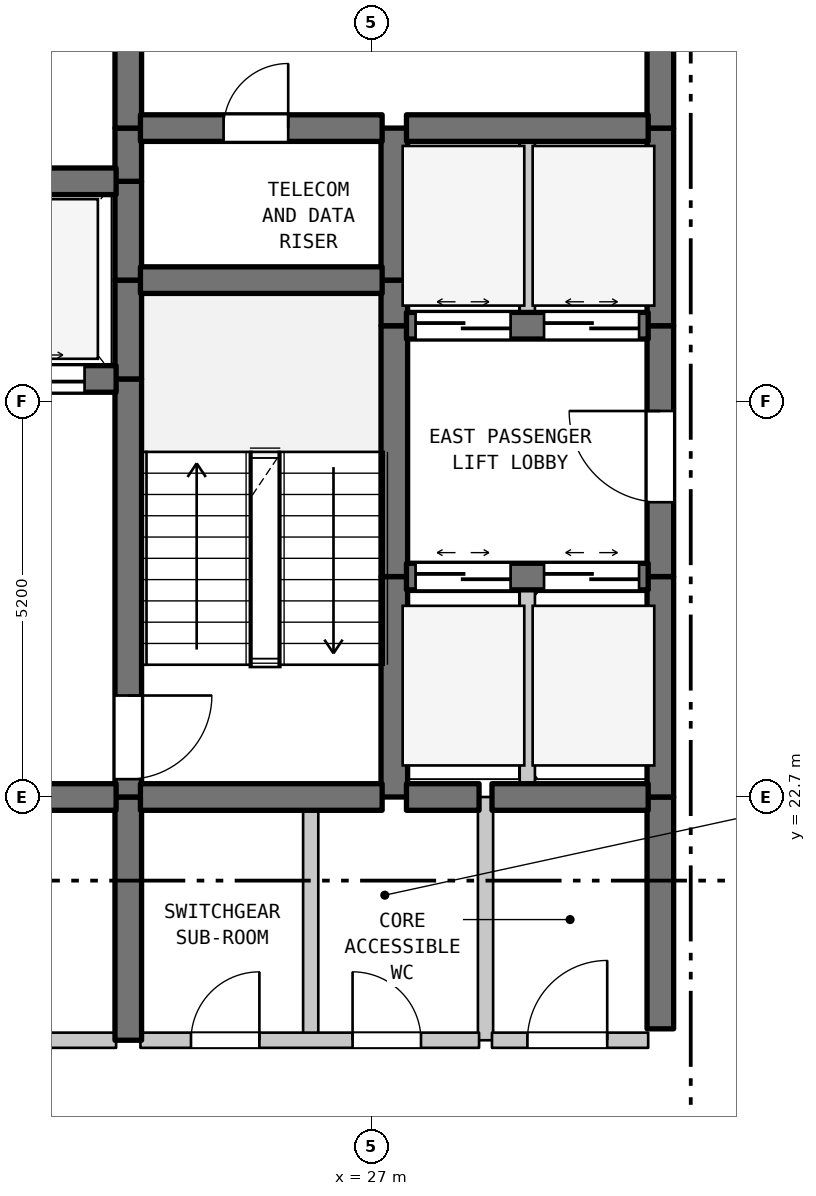
"""IFC4 building model, lengths in metres.
Left out: names, types, materials, properties, quantities, classifications, styles, units other than length and angle.
Written with IfcOpenShell. Run it as: python <this file> out.ifc"""

import sys

from ifc_helpers import new_model, si_unit, direction, frame, frame_2d, origin, place, context, subcontext, project, spatial, rectangle, extrude, element, fill, save


model = new_model("IFC4")
c1 = context("Model", 3, precision=1e-05, world=origin(), true_north=direction((0.0, 1.0)))
c2 = subcontext(c1, "Body", "Model", "MODEL_VIEW")
j1 = project(units=[si_unit("LENGTHUNIT", "METRE"), si_unit("PLANEANGLEUNIT", "RADIAN")], contexts=[c1])
p1 = place(None, origin())
s1 = spatial("IfcSite", under=j1, at=p1, CompositionType="ELEMENT")
p2 = place(p1, origin())
s2 = spatial("IfcBuilding", under=s1, at=p2, CompositionType="ELEMENT")
p3 = place(p2, frame((0.0, 0.0, 27.7)))
s3 = spatial("IfcBuildingStorey", under=s2, at=p3, CompositionType="ELEMENT", Elevation=27.7)
p4 = place(p3, frame((23.8, 19.5, 0.0), z_axis=(0.0, 0.0, 1.0), x_axis=(0.0, 1.0, 0.0)))
e1 = element("IfcWall", 1, at=p4, inside=s3, PredefinedType="SHEAR", context=c2, shape_type="SweptSolid", body=[
    extrude(rectangle(XDim=3.2, YDim=0.35, at=frame_2d((1.6, 0.0))), origin(), (0.0, 0.0, 1.0), 3.385),
])
p5 = place(p3, frame((23.8, 22.7, 0.0), z_axis=(0.0, 0.0, 1.0), x_axis=(0.0, 1.0, 0.0)))
e2 = element("IfcWall", 2, at=p5, inside=s3, PredefinedType="SHEAR", context=c2, shape_type="SweptSolid", body=[
    extrude(rectangle(XDim=5.5, YDim=0.35, at=frame_2d((2.75, 0.0))), origin(), (0.0, 0.0, 1.0), 3.385),
])
p6 = place(p5, frame((0.235, 0.0, 0.0)))
e3 = element("IfcOpeningElement", 3, at=p6, cuts=e2, PredefinedType="OPENING", context=c2, shape_type="SweptSolid", body=[
    extrude(rectangle(XDim=1.1, YDim=2.15, at=frame_2d((0.55, 1.075))), frame((0.0, 0.185, 0.0), z_axis=(0.0, -1.0, 0.0), x_axis=(1.0, 0.0, 0.0)), (0.0, 0.0, 1.0), 0.37),
])
for number, where, z_axis, x_axis in (
    (4, (23.8, 28.2, 0.0), (0.0, 0.0, 1.0), (0.0, 1.0, 0.0)),
    (5, (23.8, 29.5, 0.0), (0.0, 0.0, 1.0), (0.0, 1.0, 0.0)),
):
    element("IfcWall", number, at=place(p3, frame(where, z_axis=z_axis, x_axis=x_axis)), inside=s3, PredefinedType="SHEAR", context=c2, shape_type="SweptSolid", body=[
        extrude(rectangle(XDim=1.3, YDim=0.35, at=frame_2d((0.65, 0.0))), origin(), (0.0, 0.0, 1.0), 3.385),
    ])
p7 = place(p3, frame((23.8, 30.8, 0.0), z_axis=(0.0, 0.0, 1.0), x_axis=(0.0, 1.0, 0.0)))
e6 = element("IfcWall", 6, at=p7, inside=s3, PredefinedType="SHEAR", context=c2, shape_type="SweptSolid", body=[
    extrude(rectangle(XDim=0.7, YDim=0.35, at=frame_2d((0.35, 0.0))), origin(), (0.0, 0.0, 1.0), 3.385),
])
p8 = place(p3, frame((23.8, 31.5, 0.0), z_axis=(0.0, 0.0, 1.0), x_axis=(0.0, 1.0, 0.0)))
e7 = element("IfcWall", 7, at=p8, inside=s3, PredefinedType="SHEAR", context=c2, shape_type="SweptSolid", body=[
    extrude(rectangle(XDim=3.5, YDim=0.35, at=frame_2d((1.75, 0.0))), origin(), (0.0, 0.0, 1.0), 3.385),
])
p9 = place(p8, frame((1.127, 0.0, 0.0)))
e8 = element("IfcOpeningElement", 8, at=p9, cuts=e7, PredefinedType="OPENING", context=c2, shape_type="SweptSolid", body=[
    extrude(rectangle(XDim=1.1, YDim=2.15, at=frame_2d((0.55, 1.075))), frame((0.0, 0.185, 0.0), z_axis=(0.0, -1.0, 0.0), x_axis=(1.0, 0.0, 0.0)), (0.0, 0.0, 1.0), 0.37),
])
p10 = place(p3, frame((26.2, 19.5, 0.0), z_axis=(0.0, 0.0, 1.0), x_axis=(0.0, 1.0, 0.0)))
e9 = element("IfcWall", 9, at=p10, inside=s3, PredefinedType="STANDARD", context=c2, shape_type="SweptSolid", body=[
    extrude(rectangle(XDim=3.2, YDim=0.2, at=frame_2d((1.6, 0.0))), origin(), (0.0, 0.0, 1.0), 3.385),
])
p11 = place(p3, frame((27.3, 22.7, 0.0), z_axis=(0.0, 0.0, 1.0), x_axis=(0.0, 1.0, 0.0)))
e10 = element("IfcWall", 10, at=p11, inside=s3, PredefinedType="SHEAR", context=c2, shape_type="SweptSolid", body=[
    extrude(rectangle(XDim=2.9, YDim=0.35, at=frame_2d((1.45, 0.0))), origin(), (0.0, 0.0, 1.0), 3.385),
])
p12 = place(p3, frame((27.3, 25.6, 0.0), z_axis=(0.0, 0.0, 1.0), x_axis=(0.0, 1.0, 0.0)))
e11 = element("IfcWall", 11, at=p12, inside=s3, PredefinedType="SHEAR", context=c2, shape_type="SweptSolid", body=[
    extrude(rectangle(XDim=3.3, YDim=0.35, at=frame_2d((1.65, 0.0))), origin(), (0.0, 0.0, 1.0), 3.385),
])
p13 = place(p3, frame((27.3, 28.9, 0.0), z_axis=(0.0, 0.0, 1.0), x_axis=(0.0, 1.0, 0.0)))
e12 = element("IfcWall", 12, at=p13, inside=s3, PredefinedType="SHEAR", context=c2, shape_type="SweptSolid", body=[
    extrude(rectangle(XDim=0.6, YDim=0.35, at=frame_2d((0.3, 0.0))), origin(), (0.0, 0.0, 1.0), 3.385),
])
p14 = place(p3, frame((27.3, 29.5, 0.0), z_axis=(0.0, 0.0, 1.0), x_axis=(0.0, 1.0, 0.0)))
e13 = element("IfcWall", 13, at=p14, inside=s3, PredefinedType="SHEAR", context=c2, shape_type="SweptSolid", body=[
    extrude(rectangle(XDim=2.0, YDim=0.35, at=frame_2d((1.0, 0.0))), origin(), (0.0, 0.0, 1.0), 3.385),
])
p15 = place(p3, frame((28.5, 19.5, 0.0), z_axis=(0.0, 0.0, 1.0), x_axis=(0.0, 1.0, 0.0)))
e14 = element("IfcWall", 14, at=p15, inside=s3, PredefinedType="STANDARD", context=c2, shape_type="SweptSolid", body=[
    extrude(rectangle(XDim=3.2, YDim=0.2, at=frame_2d((1.6, 0.0))), origin(), (0.0, 0.0, 1.0), 3.385),
])
p16 = place(p3, frame((29.05, 22.7, 0.0), z_axis=(0.0, 0.0, 1.0), x_axis=(0.0, 1.0, 0.0)))
e15 = element("IfcWall", 15, at=p16, inside=s3, PredefinedType="STANDARD", context=c2, shape_type="SweptSolid", body=[
    extrude(rectangle(XDim=2.9, YDim=0.2, at=frame_2d((1.45, 0.0))), origin(), (0.0, 0.0, 1.0), 3.385),
])
p17 = place(p3, frame((29.05, 28.9, 0.0), z_axis=(0.0, 0.0, 1.0), x_axis=(0.0, 1.0, 0.0)))
e16 = element("IfcWall", 16, at=p17, inside=s3, PredefinedType="STANDARD", context=c2, shape_type="SweptSolid", body=[
    extrude(rectangle(XDim=2.6, YDim=0.2, at=frame_2d((1.3, 0.0))), origin(), (0.0, 0.0, 1.0), 3.385),
])
p18 = place(p3, frame((30.8, 19.65, 0.0), z_axis=(0.0, 0.0, 1.0), x_axis=(0.0, 1.0, 0.0)))
e17 = element("IfcWall", 17, at=p18, inside=s3, PredefinedType="SHEAR", context=c2, shape_type="SweptSolid", body=[
    extrude(rectangle(XDim=3.05, YDim=0.35, at=frame_2d((1.525, 0.0))), origin(), (0.0, 0.0, 1.0), 3.385),
])
p19 = place(p3, frame((30.8, 22.7, 0.0), z_axis=(0.0, 0.0, 1.0), x_axis=(0.0, 1.0, 0.0)))
e18 = element("IfcWall", 18, at=p19, inside=s3, PredefinedType="SHEAR", context=c2, shape_type="SweptSolid", body=[
    extrude(rectangle(XDim=2.9, YDim=0.35, at=frame_2d((1.45, 0.0))), origin(), (0.0, 0.0, 1.0), 3.385),
])
p20 = place(p3, frame((30.8, 25.6, 0.0), z_axis=(0.0, 0.0, 1.0), x_axis=(0.0, 1.0, 0.0)))
e19 = element("IfcWall", 19, at=p20, inside=s3, PredefinedType="SHEAR", context=c2, shape_type="SweptSolid", body=[
    extrude(rectangle(XDim=3.3, YDim=0.35, at=frame_2d((1.65, 0.0))), origin(), (0.0, 0.0, 1.0), 3.385),
])
p21 = place(p20, frame((0.978, 0.0, 0.0)))
e20 = element("IfcOpeningElement", 20, at=p21, cuts=e19, PredefinedType="OPENING", context=c2, shape_type="SweptSolid", body=[
    extrude(rectangle(XDim=1.2, YDim=2.2, at=frame_2d((0.6, 1.1))), frame((0.0, 0.185, 0.0), z_axis=(0.0, -1.0, 0.0), x_axis=(1.0, 0.0, 0.0)), (0.0, 0.0, 1.0), 0.37),
])
p22 = place(p3, frame((30.8, 28.9, 0.0), z_axis=(0.0, 0.0, 1.0), x_axis=(0.0, 1.0, 0.0)))
e21 = element("IfcWall", 21, at=p22, inside=s3, PredefinedType="SHEAR", context=c2, shape_type="SweptSolid", body=[
    extrude(rectangle(XDim=2.6, YDim=0.35, at=frame_2d((1.3, 0.0))), origin(), (0.0, 0.0, 1.0), 3.385),
])
p23 = place(p3, frame((30.8, 31.5, 0.0), z_axis=(0.0, 0.0, 1.0), x_axis=(0.0, 1.0, 0.0)))
e22 = element("IfcWall", 22, at=p23, inside=s3, PredefinedType="SHEAR", context=c2, shape_type="SweptSolid", body=[
    extrude(rectangle(XDim=3.5, YDim=0.35, at=frame_2d((1.75, 0.0))), origin(), (0.0, 0.0, 1.0), 3.385),
])
p24 = place(p23, frame((1.15, 0.0, 0.0)))
e23 = element("IfcOpeningElement", 23, at=p24, cuts=e22, PredefinedType="OPENING", context=c2, shape_type="SweptSolid", body=[
    extrude(rectangle(XDim=1.2, YDim=2.2, at=frame_2d((0.6, 1.1))), frame((0.0, 0.185, 0.0), z_axis=(0.0, -1.0, 0.0), x_axis=(1.0, 0.0, 0.0)), (0.0, 0.0, 1.0), 0.37),
])
p25 = place(p3, frame((19.16, 19.5, 0.0), z_axis=(0.0, 0.0, 1.0), x_axis=(1.0, 0.0, 0.0)))
e24 = element("IfcWall", 24, at=p25, inside=s3, PredefinedType="STANDARD", context=c2, shape_type="SweptSolid", body=[
    extrude(rectangle(XDim=4.48, YDim=0.2, at=frame_2d((2.24, 0.0))), origin(), (0.0, 0.0, 1.0), 3.385),
])
p26 = place(p25, frame((1.64, 0.0, 0.0)))
e25 = element("IfcOpeningElement", 25, at=p26, cuts=e24, PredefinedType="OPENING", context=c2, shape_type="SweptSolid", body=[
    extrude(rectangle(XDim=1.2, YDim=2.2, at=frame_2d((0.6, 1.1))), frame((0.0, 0.11, 0.0), z_axis=(0.0, -1.0, 0.0), x_axis=(1.0, 0.0, 0.0)), (0.0, 0.0, 1.0), 0.22),
])
p27 = place(p3, frame((23.96, 19.5, 0.0), z_axis=(0.0, 0.0, 1.0), x_axis=(1.0, 0.0, 0.0)))
e26 = element("IfcWall", 26, at=p27, inside=s3, PredefinedType="STANDARD", context=c2, shape_type="SweptSolid", body=[
    extrude(rectangle(XDim=4.455, YDim=0.2, at=frame_2d((2.228, 0.0))), origin(), (0.0, 0.0, 1.0), 3.385),
])
p28 = place(p27, frame((0.665, 0.0, 0.0)))
e27 = element("IfcOpeningElement", 27, at=p28, cuts=e26, PredefinedType="OPENING", context=c2, shape_type="SweptSolid", body=[
    extrude(rectangle(XDim=0.9, YDim=2.15, at=frame_2d((0.45, 1.075))), frame((0.0, 0.11, 0.0), z_axis=(0.0, -1.0, 0.0), x_axis=(1.0, 0.0, 0.0)), (0.0, 0.0, 1.0), 0.22),
])
p29 = place(p27, frame((2.791, 0.0, 0.0)))
e28 = element("IfcOpeningElement", 28, at=p29, cuts=e26, PredefinedType="OPENING", context=c2, shape_type="SweptSolid", body=[
    extrude(rectangle(XDim=0.9, YDim=2.15, at=frame_2d((0.45, 1.075))), frame((0.0, 0.11, 0.0), z_axis=(0.0, -1.0, 0.0), x_axis=(1.0, 0.0, 0.0)), (0.0, 0.0, 1.0), 0.22),
])
p30 = place(p3, frame((28.585, 19.5, 0.0), z_axis=(0.0, 0.0, 1.0), x_axis=(1.0, 0.0, 0.0)))
e29 = element("IfcWall", 29, at=p30, inside=s3, PredefinedType="STANDARD", context=c2, shape_type="SweptSolid", body=[
    extrude(rectangle(XDim=2.055, YDim=0.2, at=frame_2d((1.027, 0.0))), origin(), (0.0, 0.0, 1.0), 3.385),
])
p31 = place(p30, frame((0.466, 0.0, 0.0)))
e30 = element("IfcOpeningElement", 30, at=p31, cuts=e29, PredefinedType="OPENING", context=c2, shape_type="SweptSolid", body=[
    extrude(rectangle(XDim=1.05, YDim=2.15, at=frame_2d((0.525, 1.075))), frame((0.0, 0.11, 0.0), z_axis=(0.0, -1.0, 0.0), x_axis=(1.0, 0.0, 0.0)), (0.0, 0.0, 1.0), 0.22),
])
p32 = place(p3, frame((19.16, 22.7, 0.0), z_axis=(0.0, 0.0, 1.0), x_axis=(1.0, 0.0, 0.0)))
e31 = element("IfcWall", 31, at=p32, inside=s3, PredefinedType="SHEAR", context=c2, shape_type="SweptSolid", body=[
    extrude(rectangle(XDim=4.48, YDim=0.35, at=frame_2d((2.24, 0.0))), origin(), (0.0, 0.0, 1.0), 3.385),
])
p33 = place(p32, frame((1.64, 0.0, 0.0)))
e32 = element("IfcOpeningElement", 32, at=p33, cuts=e31, PredefinedType="OPENING", context=c2, shape_type="SweptSolid", body=[
    extrude(rectangle(XDim=1.2, YDim=2.2, at=frame_2d((0.6, 1.1))), frame((0.0, 0.185, 0.0), z_axis=(0.0, -1.0, 0.0), x_axis=(1.0, 0.0, 0.0)), (0.0, 0.0, 1.0), 0.37),
])
p34 = place(p3, frame((23.96, 22.7, 0.0), z_axis=(0.0, 0.0, 1.0), x_axis=(1.0, 0.0, 0.0)))
e33 = element("IfcWall", 33, at=p34, inside=s3, PredefinedType="SHEAR", context=c2, shape_type="SweptSolid", body=[
    extrude(rectangle(XDim=3.18, YDim=0.35, at=frame_2d((1.59, 0.0))), origin(), (0.0, 0.0, 1.0), 3.385),
])
p35 = place(p3, frame((27.46, 22.7, 0.0), z_axis=(0.0, 0.0, 1.0), x_axis=(1.0, 0.0, 0.0)))
e34 = element("IfcWall", 34, at=p35, inside=s3, PredefinedType="SHEAR", context=c2, shape_type="SweptSolid", body=[
    extrude(rectangle(XDim=0.955, YDim=0.35, at=frame_2d((0.478, 0.0))), origin(), (0.0, 0.0, 1.0), 3.385),
])
p36 = place(p3, frame((28.585, 22.7, 0.0), z_axis=(0.0, 0.0, 1.0), x_axis=(1.0, 0.0, 0.0)))
e35 = element("IfcWall", 35, at=p36, inside=s3, PredefinedType="SHEAR", context=c2, shape_type="SweptSolid", body=[
    extrude(rectangle(XDim=2.055, YDim=0.35, at=frame_2d((1.027, 0.0))), origin(), (0.0, 0.0, 1.0), 3.385),
])
p37 = place(p3, frame((27.46, 25.6, 0.0), z_axis=(0.0, 0.0, 1.0), x_axis=(1.0, 0.0, 0.0)))
e36 = element("IfcWall", 36, at=p37, inside=s3, PredefinedType="SHEAR", context=c2, shape_type="SweptSolid", body=[
    extrude(rectangle(XDim=3.18, YDim=0.35, at=frame_2d((1.59, 0.0))), origin(), (0.0, 0.0, 1.0), 3.385),
])
p38 = place(p37, frame((0.12, 0.0, 0.0)))
e37 = element("IfcOpeningElement", 37, at=p38, cuts=e36, PredefinedType="OPENING", context=c2, shape_type="SweptSolid", body=[
    extrude(rectangle(XDim=1.25, YDim=2.2, at=frame_2d((0.625, 1.1))), frame((0.0, 0.185, 0.0), z_axis=(0.0, -1.0, 0.0), x_axis=(1.0, 0.0, 0.0)), (0.0, 0.0, 1.0), 0.37),
])
p39 = place(p37, frame((1.81, 0.0, 0.0)))
e38 = element("IfcOpeningElement", 38, at=p39, cuts=e36, PredefinedType="OPENING", context=c2, shape_type="SweptSolid", body=[
    extrude(rectangle(XDim=1.25, YDim=2.2, at=frame_2d((0.625, 1.1))), frame((0.0, 0.185, 0.0), z_axis=(0.0, -1.0, 0.0), x_axis=(1.0, 0.0, 0.0)), (0.0, 0.0, 1.0), 0.37),
])
p40 = place(p3, frame((19.16, 28.2, 0.0), z_axis=(0.0, 0.0, 1.0), x_axis=(1.0, 0.0, 0.0)))
e39 = element("IfcWall", 39, at=p40, inside=s3, PredefinedType="SHEAR", context=c2, shape_type="SweptSolid", body=[
    extrude(rectangle(XDim=4.48, YDim=0.35, at=frame_2d((2.24, 0.0))), origin(), (0.0, 0.0, 1.0), 3.385),
])
p41 = place(p40, frame((0.415, 0.0, 0.0)))
e40 = element("IfcOpeningElement", 40, at=p41, cuts=e39, PredefinedType="OPENING", context=c2, shape_type="SweptSolid", body=[
    extrude(rectangle(XDim=1.25, YDim=2.2, at=frame_2d((0.625, 1.1))), frame((0.0, 0.185, 0.0), z_axis=(0.0, -1.0, 0.0), x_axis=(1.0, 0.0, 0.0)), (0.0, 0.0, 1.0), 0.37),
])
p42 = place(p40, frame((2.815, 0.0, 0.0)))
e41 = element("IfcOpeningElement", 41, at=p42, cuts=e39, PredefinedType="OPENING", context=c2, shape_type="SweptSolid", body=[
    extrude(rectangle(XDim=1.25, YDim=2.2, at=frame_2d((0.625, 1.1))), frame((0.0, 0.185, 0.0), z_axis=(0.0, -1.0, 0.0), x_axis=(1.0, 0.0, 0.0)), (0.0, 0.0, 1.0), 0.37),
])
p43 = place(p3, frame((27.46, 28.9, 0.0), z_axis=(0.0, 0.0, 1.0), x_axis=(1.0, 0.0, 0.0)))
e42 = element("IfcWall", 42, at=p43, inside=s3, PredefinedType="SHEAR", context=c2, shape_type="SweptSolid", body=[
    extrude(rectangle(XDim=3.18, YDim=0.35, at=frame_2d((1.59, 0.0))), origin(), (0.0, 0.0, 1.0), 3.385),
])
p44 = place(p43, frame((0.12, 0.0, 0.0)))
e43 = element("IfcOpeningElement", 43, at=p44, cuts=e42, PredefinedType="OPENING", context=c2, shape_type="SweptSolid", body=[
    extrude(rectangle(XDim=1.25, YDim=2.2, at=frame_2d((0.625, 1.1))), frame((0.0, 0.185, 0.0), z_axis=(0.0, -1.0, 0.0), x_axis=(1.0, 0.0, 0.0)), (0.0, 0.0, 1.0), 0.37),
])
p45 = place(p43, frame((1.81, 0.0, 0.0)))
e44 = element("IfcOpeningElement", 44, at=p45, cuts=e42, PredefinedType="OPENING", context=c2, shape_type="SweptSolid", body=[
    extrude(rectangle(XDim=1.25, YDim=2.2, at=frame_2d((0.625, 1.1))), frame((0.0, 0.185, 0.0), z_axis=(0.0, -1.0, 0.0), x_axis=(1.0, 0.0, 0.0)), (0.0, 0.0, 1.0), 0.37),
])
p46 = place(p3, frame((23.96, 29.5, 0.0), z_axis=(0.0, 0.0, 1.0), x_axis=(1.0, 0.0, 0.0)))
e45 = element("IfcWall", 45, at=p46, inside=s3, PredefinedType="SHEAR", context=c2, shape_type="SweptSolid", body=[
    extrude(rectangle(XDim=3.18, YDim=0.35, at=frame_2d((1.59, 0.0))), origin(), (0.0, 0.0, 1.0), 3.385),
])
p47 = place(p3, frame((19.16, 30.8, 0.0), z_axis=(0.0, 0.0, 1.0), x_axis=(1.0, 0.0, 0.0)))
e46 = element("IfcWall", 46, at=p47, inside=s3, PredefinedType="SHEAR", context=c2, shape_type="SweptSolid", body=[
    extrude(rectangle(XDim=4.48, YDim=0.35, at=frame_2d((2.24, 0.0))), origin(), (0.0, 0.0, 1.0), 3.385),
])
p48 = place(p3, frame((23.96, 31.5, 0.0), z_axis=(0.0, 0.0, 1.0), x_axis=(1.0, 0.0, 0.0)))
e47 = element("IfcWall", 47, at=p48, inside=s3, PredefinedType="SHEAR", context=c2, shape_type="SweptSolid", body=[
    extrude(rectangle(XDim=3.18, YDim=0.35, at=frame_2d((1.59, 0.0))), origin(), (0.0, 0.0, 1.0), 3.385),
])
p49 = place(p48, frame((1.094, 0.0, 0.0)))
e48 = element("IfcOpeningElement", 48, at=p49, cuts=e47, PredefinedType="OPENING", context=c2, shape_type="SweptSolid", body=[
    extrude(rectangle(XDim=0.85, YDim=2.1, at=frame_2d((0.425, 1.05))), frame((0.0, 0.185, 0.0), z_axis=(0.0, -1.0, 0.0), x_axis=(1.0, 0.0, 0.0)), (0.0, 0.0, 1.0), 0.37),
])
p50 = place(p3, frame((27.46, 31.5, 0.0), z_axis=(0.0, 0.0, 1.0), x_axis=(1.0, 0.0, 0.0)))
e49 = element("IfcWall", 49, at=p50, inside=s3, PredefinedType="SHEAR", context=c2, shape_type="SweptSolid", body=[
    extrude(rectangle(XDim=3.18, YDim=0.35, at=frame_2d((1.59, 0.0))), origin(), (0.0, 0.0, 1.0), 3.385),
])
p51 = place(p6, frame((1.1, 0.0, 0.0), z_axis=(0.0, 0.0, 1.0), x_axis=(-1.0, 0.0, 0.0)))
e50 = element("IfcDoor", 50, at=p51, inside=s3, OperationType="SINGLE_SWING_RIGHT", PredefinedType="DOOR", context=c2, shape_type="SweptSolid", body=[
    extrude(rectangle(XDim=1.1, YDim=2.15, at=frame_2d((0.55, 1.075))), frame((0.0, 0.025, 0.0), z_axis=(0.0, -1.0, 0.0), x_axis=(1.0, 0.0, 0.0)), (0.0, 0.0, 1.0), 0.05),
])
fill(e3, e50)
p52 = place(p21, origin())
e51 = element("IfcDoor", 51, at=p52, inside=s3, OperationType="SINGLE_SWING_RIGHT", PredefinedType="DOOR", context=c2, shape_type="SweptSolid", body=[
    extrude(rectangle(XDim=1.2, YDim=2.2, at=frame_2d((0.6, 1.1))), frame((0.0, 0.025, 0.0), z_axis=(0.0, -1.0, 0.0), x_axis=(1.0, 0.0, 0.0)), (0.0, 0.0, 1.0), 0.05),
])
fill(e20, e51)
p53 = place(p28, origin())
e52 = element("IfcDoor", 52, at=p53, inside=s3, OperationType="SINGLE_SWING_RIGHT", PredefinedType="DOOR", context=c2, shape_type="SweptSolid", body=[
    extrude(rectangle(XDim=0.9, YDim=2.15, at=frame_2d((0.45, 1.075))), frame((0.0, 0.025, 0.0), z_axis=(0.0, -1.0, 0.0), x_axis=(1.0, 0.0, 0.0)), (0.0, 0.0, 1.0), 0.05),
])
fill(e27, e52)
p54 = place(p29, origin())
e53 = element("IfcDoor", 53, at=p54, inside=s3, OperationType="SINGLE_SWING_LEFT", PredefinedType="DOOR", context=c2, shape_type="SweptSolid", body=[
    extrude(rectangle(XDim=0.9, YDim=2.15, at=frame_2d((0.45, 1.075))), frame((0.0, 0.025, 0.0), z_axis=(0.0, -1.0, 0.0), x_axis=(1.0, 0.0, 0.0)), (0.0, 0.0, 1.0), 0.05),
])
fill(e28, e53)
p55 = place(p31, origin())
e54 = element("IfcDoor", 54, at=p55, inside=s3, OperationType="SINGLE_SWING_RIGHT", PredefinedType="DOOR", context=c2, shape_type="SweptSolid", body=[
    extrude(rectangle(XDim=1.05, YDim=2.15, at=frame_2d((0.525, 1.075))), frame((0.0, 0.025, 0.0), z_axis=(0.0, -1.0, 0.0), x_axis=(1.0, 0.0, 0.0)), (0.0, 0.0, 1.0), 0.05),
])
fill(e30, e54)
p56 = place(p38, origin())
e55 = element("IfcDoor", 55, at=p56, inside=s3, OperationType="DOUBLE_DOOR_SLIDING", PredefinedType="DOOR", context=c2, shape_type="SweptSolid", body=[
    extrude(rectangle(XDim=1.25, YDim=2.2, at=frame_2d((0.625, 1.1))), frame((0.0, 0.025, 0.0), z_axis=(0.0, -1.0, 0.0), x_axis=(1.0, 0.0, 0.0)), (0.0, 0.0, 1.0), 0.05),
])
fill(e37, e55)
p57 = place(p39, origin())
e56 = element("IfcDoor", 56, at=p57, inside=s3, OperationType="DOUBLE_DOOR_SLIDING", PredefinedType="DOOR", context=c2, shape_type="SweptSolid", body=[
    extrude(rectangle(XDim=1.25, YDim=2.2, at=frame_2d((0.625, 1.1))), frame((0.0, 0.025, 0.0), z_axis=(0.0, -1.0, 0.0), x_axis=(1.0, 0.0, 0.0)), (0.0, 0.0, 1.0), 0.05),
])
fill(e38, e56)
p58 = place(p42, origin())
e57 = element("IfcDoor", 57, at=p58, inside=s3, OperationType="DOUBLE_DOOR_SLIDING", PredefinedType="DOOR", context=c2, shape_type="SweptSolid", body=[
    extrude(rectangle(XDim=1.25, YDim=2.2, at=frame_2d((0.625, 1.1))), frame((0.0, 0.025, 0.0), z_axis=(0.0, -1.0, 0.0), x_axis=(1.0, 0.0, 0.0)), (0.0, 0.0, 1.0), 0.05),
])
fill(e41, e57)
p59 = place(p44, origin())
e58 = element("IfcDoor", 58, at=p59, inside=s3, OperationType="DOUBLE_DOOR_SLIDING", PredefinedType="DOOR", context=c2, shape_type="SweptSolid", body=[
    extrude(rectangle(XDim=1.25, YDim=2.2, at=frame_2d((0.625, 1.1))), frame((0.0, 0.025, 0.0), z_axis=(0.0, -1.0, 0.0), x_axis=(1.0, 0.0, 0.0)), (0.0, 0.0, 1.0), 0.05),
])
fill(e43, e58)
p60 = place(p45, origin())
e59 = element("IfcDoor", 59, at=p60, inside=s3, OperationType="DOUBLE_DOOR_SLIDING", PredefinedType="DOOR", context=c2, shape_type="SweptSolid", body=[
    extrude(rectangle(XDim=1.25, YDim=2.2, at=frame_2d((0.625, 1.1))), frame((0.0, 0.025, 0.0), z_axis=(0.0, -1.0, 0.0), x_axis=(1.0, 0.0, 0.0)), (0.0, 0.0, 1.0), 0.05),
])
fill(e44, e59)
p61 = place(p49, origin())
e60 = element("IfcDoor", 60, at=p61, inside=s3, OperationType="SINGLE_SWING_RIGHT", PredefinedType="DOOR", context=c2, shape_type="SweptSolid", body=[
    extrude(rectangle(XDim=0.85, YDim=2.1, at=frame_2d((0.425, 1.05))), frame((0.0, 0.025, 0.0), z_axis=(0.0, -1.0, 0.0), x_axis=(1.0, 0.0, 0.0)), (0.0, 0.0, 1.0), 0.05),
])
fill(e48, e60)
save(model, sys.argv[1])
